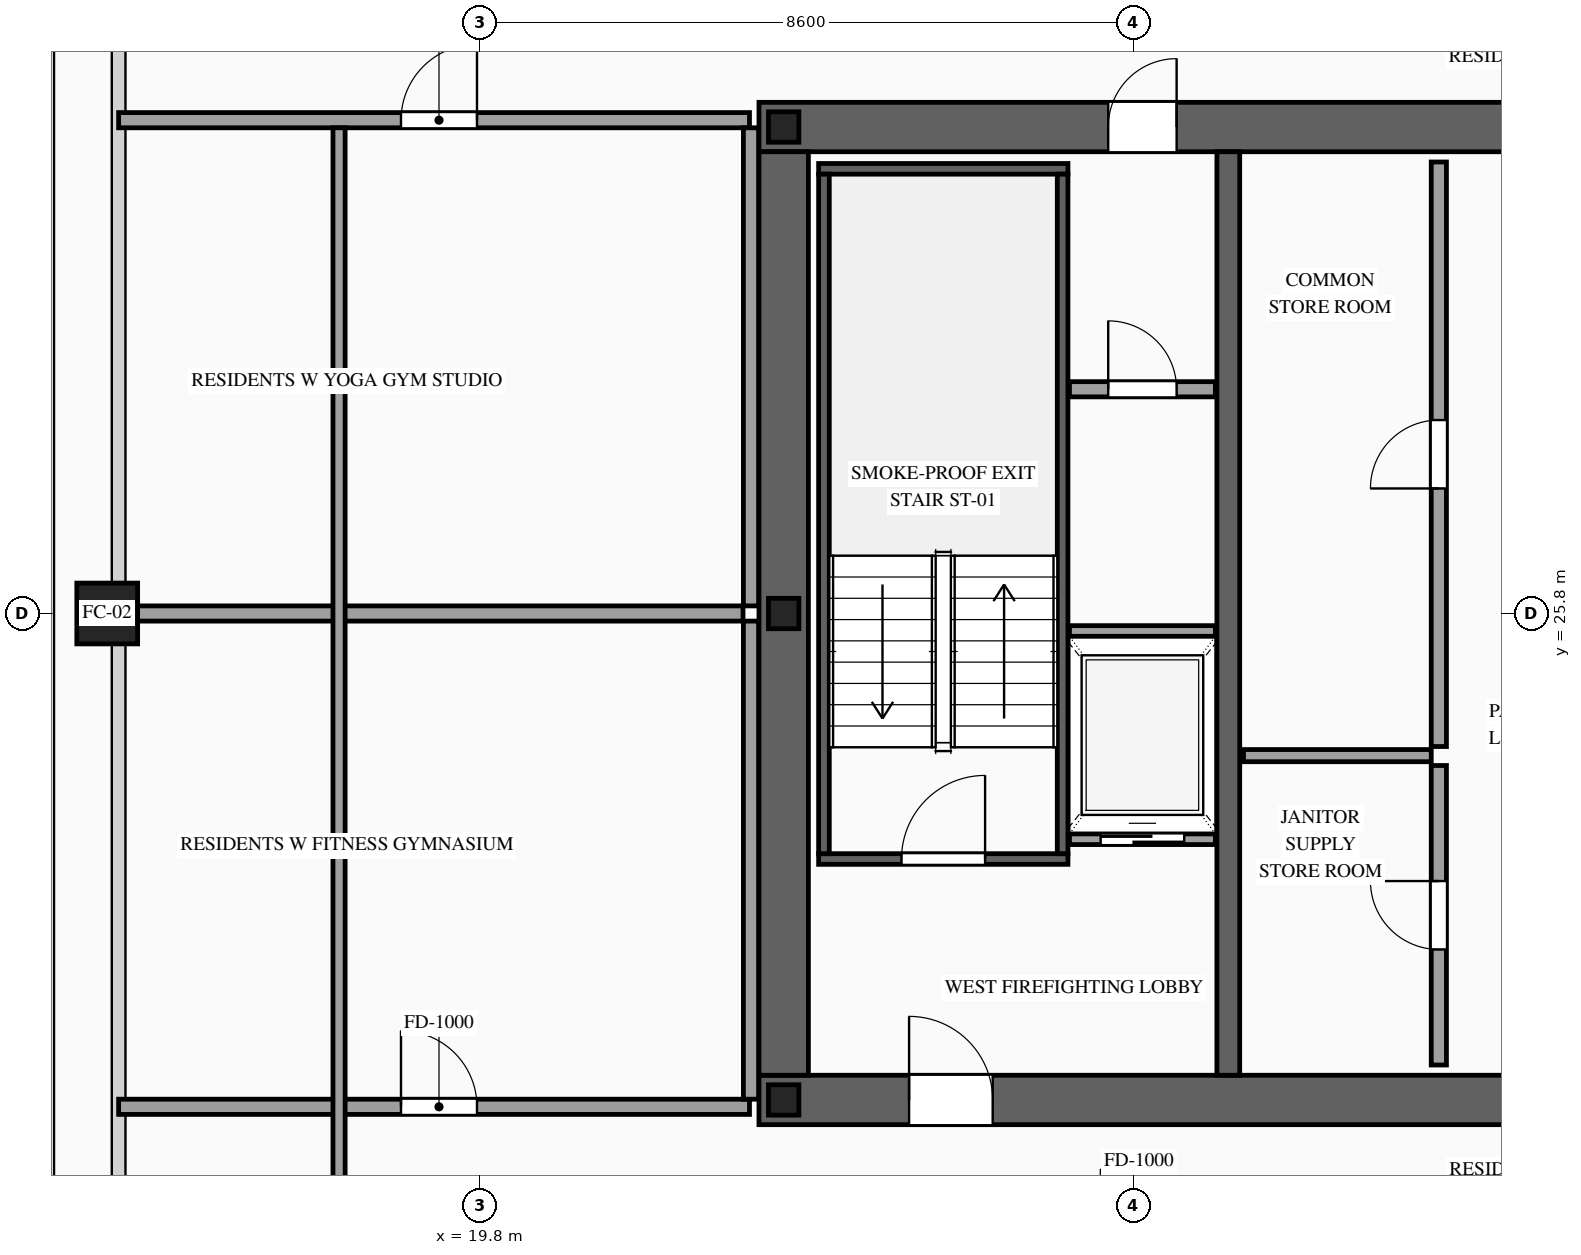
"""IFC4 building model, lengths in metres.
Left out: names, types, materials, properties, quantities, classifications, styles, units other than length and angle.
Written with IfcOpenShell. Run it as: python <this file> out.ifc"""

import sys

from ifc_helpers import new_model, si_unit, direction, frame, frame_2d, origin, origin_2d, place, context, subcontext, project, spatial, rectangle, hollow_rectangle, i_section, extrude, source, transform, mapped, element, fill, save


model = new_model("IFC4")
c1 = context("Model", 3, precision=1e-05, world=origin(), true_north=direction((0.0, 1.0)))
c2 = subcontext(c1, "Body", "Model", "MODEL_VIEW")
j1 = project(units=[si_unit("LENGTHUNIT", "METRE"), si_unit("PLANEANGLEUNIT", "RADIAN")], contexts=[c1])
p1 = place(None, origin())
s1 = spatial("IfcSite", under=j1, at=p1, CompositionType="ELEMENT")
p2 = place(p1, origin())
s2 = spatial("IfcBuilding", under=s1, at=p2, CompositionType="ELEMENT")
p3 = place(p2, frame((0.0, 0.0, 216.0)))
s3 = spatial("IfcBuildingStorey", under=s2, at=p3, CompositionType="ELEMENT", Elevation=216.0)
p4 = place(p3, frame((23.475, 19.4, 0.0), z_axis=(0.0, 0.0, 1.0), x_axis=(1.0, 0.0, 0.0)))
e1 = element("IfcWall", 1, at=p4, inside=s3, PredefinedType="SHEAR", context=c2, shape_type="SweptSolid", body=[
    extrude(rectangle(XDim=27.05, YDim=0.65, at=frame_2d((13.525, 0.0))), origin(), (0.0, 0.0, 1.0), 3.5),
])
p5 = place(p4, frame((1.975, 0.0, 0.0)))
e2 = element("IfcOpeningElement", 2, at=p5, cuts=e1, PredefinedType="OPENING", context=c2, shape_type="SweptSolid", body=[
    extrude(rectangle(XDim=1.1, YDim=2.2, at=frame_2d((0.55, 1.1))), frame((0.0, 0.34, 0.0), z_axis=(0.0, -1.0, 0.0), x_axis=(1.0, 0.0, 0.0)), (0.0, 0.0, 1.0), 0.68),
])
p6 = place(p4, frame((9.875, 0.0, 0.0)))
e3 = element("IfcOpeningElement", 3, at=p6, cuts=e1, PredefinedType="OPENING", context=c2, shape_type="SweptSolid", body=[
    extrude(rectangle(XDim=1.1, YDim=2.2, at=frame_2d((0.55, 1.1))), frame((0.0, 0.34, 0.0), z_axis=(0.0, -1.0, 0.0), x_axis=(1.0, 0.0, 0.0)), (0.0, 0.0, 1.0), 0.68),
])
p7 = place(p4, frame((23.075, 0.0, 0.0)))
e4 = element("IfcOpeningElement", 4, at=p7, cuts=e1, PredefinedType="OPENING", context=c2, shape_type="SweptSolid", body=[
    extrude(rectangle(XDim=1.1, YDim=2.2, at=frame_2d((0.55, 1.1))), frame((0.0, 0.34, 0.0), z_axis=(0.0, -1.0, 0.0), x_axis=(1.0, 0.0, 0.0)), (0.0, 0.0, 1.0), 0.68),
])
p8 = place(p4, frame((19.695, 0.0, 0.0)))
e5 = element("IfcOpeningElement", 5, at=p8, cuts=e1, PredefinedType="OPENING", context=c2, shape_type="SweptSolid", body=[
    extrude(rectangle(XDim=0.9, YDim=2.15, at=frame_2d((0.45, 1.075))), frame((0.0, 0.34, 0.0), z_axis=(0.0, -1.0, 0.0), x_axis=(1.0, 0.0, 0.0)), (0.0, 0.0, 1.0), 0.68),
])
p9 = place(p4, frame((18.255, 0.0, 0.0)))
e6 = element("IfcOpeningElement", 6, at=p9, cuts=e1, PredefinedType="OPENING", context=c2, shape_type="SweptSolid", body=[
    extrude(rectangle(XDim=0.9, YDim=2.15, at=frame_2d((0.45, 1.075))), frame((0.0, 0.34, 0.0), z_axis=(0.0, -1.0, 0.0), x_axis=(1.0, 0.0, 0.0)), (0.0, 0.0, 1.0), 0.68),
])
p10 = place(p3, frame((23.475, 32.2, 0.0), z_axis=(0.0, 0.0, 1.0), x_axis=(1.0, 0.0, 0.0)))
e7 = element("IfcWall", 7, at=p10, inside=s3, PredefinedType="SHEAR", context=c2, shape_type="SweptSolid", body=[
    extrude(rectangle(XDim=27.05, YDim=0.65, at=frame_2d((13.525, 0.0))), origin(), (0.0, 0.0, 1.0), 3.5),
])
p11 = place(p10, frame((4.595, 0.0, 0.0)))
e8 = element("IfcOpeningElement", 8, at=p11, cuts=e7, PredefinedType="OPENING", context=c2, shape_type="SweptSolid", body=[
    extrude(rectangle(XDim=0.9, YDim=2.15, at=frame_2d((0.45, 1.075))), frame((0.0, 0.34, 0.0), z_axis=(0.0, -1.0, 0.0), x_axis=(1.0, 0.0, 0.0)), (0.0, 0.0, 1.0), 0.68),
])
p12 = place(p10, frame((9.875, 0.0, 0.0)))
e9 = element("IfcOpeningElement", 9, at=p12, cuts=e7, PredefinedType="OPENING", context=c2, shape_type="SweptSolid", body=[
    extrude(rectangle(XDim=1.1, YDim=2.2, at=frame_2d((0.55, 1.1))), frame((0.0, 0.34, 0.0), z_axis=(0.0, -1.0, 0.0), x_axis=(1.0, 0.0, 0.0)), (0.0, 0.0, 1.0), 0.68),
])
p13 = place(p10, frame((15.725, 0.0, 0.0)))
e10 = element("IfcOpeningElement", 10, at=p13, cuts=e7, PredefinedType="OPENING", context=c2, shape_type="SweptSolid", body=[
    extrude(rectangle(XDim=1.1, YDim=2.2, at=frame_2d((0.55, 1.1))), frame((0.0, 0.34, 0.0), z_axis=(0.0, -1.0, 0.0), x_axis=(1.0, 0.0, 0.0)), (0.0, 0.0, 1.0), 0.68),
])
p14 = place(p10, frame((18.925, 0.0, 0.0)))
e11 = element("IfcOpeningElement", 11, at=p14, cuts=e7, PredefinedType="OPENING", context=c2, shape_type="SweptSolid", body=[
    extrude(rectangle(XDim=0.9, YDim=2.15, at=frame_2d((0.45, 1.075))), frame((0.0, 0.34, 0.0), z_axis=(0.0, -1.0, 0.0), x_axis=(1.0, 0.0, 0.0)), (0.0, 0.0, 1.0), 0.68),
])
m1 = source(origin(), c2, "Body", "SweptSolid", [
    extrude(rectangle(XDim=12.15, YDim=0.65, at=frame_2d((6.075, 0.0))), origin(), (0.0, 0.0, 1.0), 3.5),
])
p15 = place(p3, frame((23.8, 19.725, 0.0), z_axis=(0.0, 0.0, 1.0), x_axis=(0.0, 1.0, 0.0)))
e12 = element("IfcWall", 12, at=p15, inside=s3, PredefinedType="SHEAR", context=c2, shape_type="MappedRepresentation", body=[
    mapped(m1, transform((0.0, 0.0, 0.0), scale=1.0)),
])
m2 = source(origin(), c2, "Body", "SweptSolid", [
    extrude(rectangle(XDim=12.15, YDim=0.3, at=frame_2d((6.075, 0.0))), origin(), (0.0, 0.0, 1.0), 3.5),
])
p16 = place(p3, frame((29.65, 19.725, 0.0), z_axis=(0.0, 0.0, 1.0), x_axis=(0.0, 1.0, 0.0)))
e13 = element("IfcWall", 13, at=p16, inside=s3, PredefinedType="SOLIDWALL", context=c2, shape_type="MappedRepresentation", body=[
    mapped(m2, transform((0.0, 0.0, 0.0), scale=1.0)),
])
m3 = source(origin(), c2, "Body", "SweptSolid", [
    extrude(i_section(OverallWidth=0.4, OverallDepth=0.4, WebThickness=0.013, FlangeThickness=0.021, at=origin_2d()), origin(), (0.0, 0.0, 1.0), 3.5),
])
for number, where, z_axis, x_axis in (
    (14, (23.8, 19.4, 0.0), (0.0, 0.0, 1.0), (1.0, 0.0, 0.0)),
    (15, (23.8, 25.8, 0.0), (0.0, 0.0, 1.0), (1.0, 0.0, 0.0)),
    (16, (23.8, 32.2, 0.0), (0.0, 0.0, 1.0), (1.0, 0.0, 0.0)),
):
    element("IfcColumn", number, at=place(p3, frame(where, z_axis=z_axis, x_axis=x_axis)), inside=s3, PredefinedType="COLUMN", context=c2, shape_type="MappedRepresentation", body=[
        mapped(m3, transform((0.0, 0.0, 0.0), scale=1.0)),
    ])
m4 = source(origin(), c2, "Body", "SweptSolid", [
    extrude(hollow_rectangle(XDim=0.8, YDim=0.8, WallThickness=0.036, at=origin_2d()), origin(), (0.0, 0.0, 1.0), 3.22),
])
p17 = place(p3, frame((14.9, 25.8, 0.0), z_axis=(0.0, 0.0, 1.0), x_axis=(1.0, 0.0, 0.0)))
e17 = element("IfcColumn", 17, at=p17, inside=s3, PredefinedType="COLUMN", context=c2, shape_type="MappedRepresentation", body=[
    mapped(m4, transform((0.0, 0.0, 0.0), scale=1.0)),
])
p18 = place(p3, frame((27.56, 22.83, 0.0), z_axis=(0.0, 0.0, 1.0), x_axis=(1.0, 0.0, 0.0)))
e18 = element("IfcWall", 18, at=p18, inside=s3, PredefinedType="SOLIDWALL", context=c2, shape_type="SweptSolid", body=[
    extrude(rectangle(XDim=1.92, YDim=0.14, at=frame_2d((0.96, 0.0))), origin(), (0.0, 0.0, 1.0), 3.22),
])
p19 = place(p18, frame((0.41, 0.0, 0.0)))
e19 = element("IfcOpeningElement", 19, at=p19, cuts=e18, PredefinedType="OPENING", context=c2, shape_type="SweptSolid", body=[
    extrude(rectangle(XDim=1.1, YDim=2.2, at=frame_2d((0.55, 1.1))), frame((0.0, 0.085, 0.0), z_axis=(0.0, -1.0, 0.0), x_axis=(1.0, 0.0, 0.0)), (0.0, 0.0, 1.0), 0.17),
])
m5 = source(origin(), c2, "Body", "SweptSolid", [
    extrude(rectangle(XDim=1.92, YDim=0.14, at=frame_2d((0.96, 0.0))), origin(), (0.0, 0.0, 1.0), 3.22),
])
p20 = place(p3, frame((27.56, 25.57, 0.0), z_axis=(0.0, 0.0, 1.0), x_axis=(1.0, 0.0, 0.0)))
e20 = element("IfcWall", 20, at=p20, inside=s3, PredefinedType="SOLIDWALL", context=c2, shape_type="MappedRepresentation", body=[
    mapped(m5, transform((0.0, 0.0, 0.0), scale=1.0)),
])
p21 = place(p3, frame((24.26, 22.57, 0.0), z_axis=(0.0, 0.0, 1.0), x_axis=(1.0, 0.0, 0.0)))
e21 = element("IfcWall", 21, at=p21, inside=s3, PredefinedType="SOLIDWALL", context=c2, shape_type="SweptSolid", body=[
    extrude(rectangle(XDim=3.28, YDim=0.14, at=frame_2d((1.64, 0.0))), origin(), (0.0, 0.0, 1.0), 3.22),
])
p22 = place(p21, frame((1.09, 0.0, 0.0)))
e22 = element("IfcOpeningElement", 22, at=p22, cuts=e21, PredefinedType="OPENING", context=c2, shape_type="SweptSolid", body=[
    extrude(rectangle(XDim=1.1, YDim=2.2, at=frame_2d((0.55, 1.1))), frame((0.0, 0.085, 0.0), z_axis=(0.0, -1.0, 0.0), x_axis=(1.0, 0.0, 0.0)), (0.0, 0.0, 1.0), 0.17),
])
m6 = source(origin(), c2, "Body", "SweptSolid", [
    extrude(rectangle(XDim=3.28, YDim=0.14, at=frame_2d((1.64, 0.0))), origin(), (0.0, 0.0, 1.0), 3.22),
])
p23 = place(p3, frame((24.26, 31.65, 0.0), z_axis=(0.0, 0.0, 1.0), x_axis=(1.0, 0.0, 0.0)))
e23 = element("IfcWall", 23, at=p23, inside=s3, PredefinedType="SOLIDWALL", context=c2, shape_type="MappedRepresentation", body=[
    mapped(m6, transform((0.0, 0.0, 0.0), scale=1.0)),
])
m7 = source(origin(), c2, "Body", "SweptSolid", [
    extrude(rectangle(XDim=8.94, YDim=0.14, at=frame_2d((4.47, 0.0))), origin(), (0.0, 0.0, 1.0), 3.22),
])
for number, where, z_axis, x_axis in (
    (24, (24.33, 22.64, 0.0), (0.0, 0.0, 1.0), (0.0, 1.0, 0.0)),
    (25, (27.47, 22.64, 0.0), (0.0, 0.0, 1.0), (0.0, 1.0, 0.0)),
):
    element("IfcWall", number, at=place(p3, frame(where, z_axis=z_axis, x_axis=x_axis)), inside=s3, PredefinedType="SOLIDWALL", context=c2, shape_type="MappedRepresentation", body=[
        mapped(m7, transform((0.0, 0.0, 0.0), scale=1.0)),
    ])
p24 = place(p3, frame((27.56, 28.75, 0.0), z_axis=(0.0, 0.0, 1.0), x_axis=(1.0, 0.0, 0.0)))
e26 = element("IfcWall", 26, at=p24, inside=s3, PredefinedType="PARTITIONING", context=c2, shape_type="SweptSolid", body=[
    extrude(rectangle(XDim=1.92, YDim=0.2, at=frame_2d((0.96, 0.0))), origin(), (0.0, 0.0, 1.0), 3.22),
])
p25 = place(p24, frame((0.51, 0.0, 0.0)))
e27 = element("IfcOpeningElement", 27, at=p25, cuts=e26, PredefinedType="OPENING", context=c2, shape_type="SweptSolid", body=[
    extrude(rectangle(XDim=0.9, YDim=2.15, at=frame_2d((0.45, 1.075))), frame((0.0, 0.115, 0.0), z_axis=(0.0, -1.0, 0.0), x_axis=(1.0, 0.0, 0.0)), (0.0, 0.0, 1.0), 0.23),
])
p26 = place(p3, frame((32.42, 19.86, 0.0), z_axis=(0.0, 0.0, 1.0), x_axis=(0.0, 1.0, 0.0)))
e28 = element("IfcWall", 28, at=p26, inside=s3, PredefinedType="PARTITIONING", context=c2, shape_type="SweptSolid", body=[
    extrude(rectangle(XDim=3.94, YDim=0.2, at=frame_2d((1.97, 0.0))), origin(), (0.0, 0.0, 1.0), 3.22),
])
p27 = place(p26, frame((1.52, 0.0, 0.0)))
e29 = element("IfcOpeningElement", 29, at=p27, cuts=e28, PredefinedType="OPENING", context=c2, shape_type="SweptSolid", body=[
    extrude(rectangle(XDim=0.9, YDim=2.15, at=frame_2d((0.45, 1.075))), frame((0.0, 0.115, 0.0), z_axis=(0.0, -1.0, 0.0), x_axis=(1.0, 0.0, 0.0)), (0.0, 0.0, 1.0), 0.23),
])
p28 = place(p3, frame((32.42, 24.05, 0.0), z_axis=(0.0, 0.0, 1.0), x_axis=(0.0, 1.0, 0.0)))
e30 = element("IfcWall", 30, at=p28, inside=s3, PredefinedType="PARTITIONING", context=c2, shape_type="SweptSolid", body=[
    extrude(rectangle(XDim=7.69, YDim=0.2, at=frame_2d((3.845, 0.0))), origin(), (0.0, 0.0, 1.0), 3.22),
])
p29 = place(p28, frame((3.395, 0.0, 0.0)))
e31 = element("IfcOpeningElement", 31, at=p29, cuts=e30, PredefinedType="OPENING", context=c2, shape_type="SweptSolid", body=[
    extrude(rectangle(XDim=0.9, YDim=2.15, at=frame_2d((0.45, 1.075))), frame((0.0, 0.115, 0.0), z_axis=(0.0, -1.0, 0.0), x_axis=(1.0, 0.0, 0.0)), (0.0, 0.0, 1.0), 0.23),
])
m8 = source(origin(), c2, "Body", "SweptSolid", [
    extrude(rectangle(XDim=2.47, YDim=0.16, at=frame_2d((1.235, 0.0))), origin(), (0.0, 0.0, 1.0), 3.22),
])
p30 = place(p3, frame((29.85, 23.93, 0.0), z_axis=(0.0, 0.0, 1.0), x_axis=(1.0, 0.0, 0.0)))
e32 = element("IfcWall", 32, at=p30, inside=s3, PredefinedType="PARTITIONING", context=c2, shape_type="MappedRepresentation", body=[
    mapped(m8, transform((0.0, 0.0, 0.0), scale=1.0)),
])
p31 = place(p3, frame((15.05, 19.31, 0.0), z_axis=(0.0, 0.0, 1.0), x_axis=(1.0, 0.0, 0.0)))
e33 = element("IfcWall", 33, at=p31, inside=s3, PredefinedType="PARTITIONING", context=c2, shape_type="SweptSolid", body=[
    extrude(rectangle(XDim=8.3, YDim=0.2, at=frame_2d((4.15, 0.0))), origin(), (0.0, 0.0, 1.0), 3.22),
])
p32 = place(p31, frame((3.715, 0.0, 0.0)))
e34 = element("IfcOpeningElement", 34, at=p32, cuts=e33, PredefinedType="OPENING", context=c2, shape_type="SweptSolid", body=[
    extrude(rectangle(XDim=1.0, YDim=2.2, at=frame_2d((0.5, 1.1))), frame((0.0, 0.115, 0.0), z_axis=(0.0, -1.0, 0.0), x_axis=(1.0, 0.0, 0.0)), (0.0, 0.0, 1.0), 0.23),
])
m9 = source(origin(), c2, "Body", "SweptSolid", [
    extrude(rectangle(XDim=8.215, YDim=0.2, at=frame_2d((4.107, 0.0))), origin(), (0.0, 0.0, 1.0), 1.615),
])
p33 = place(p3, frame((15.05, 25.8, 0.0), z_axis=(0.0, 0.0, 1.0), x_axis=(1.0, 0.0, 0.0)))
e35 = element("IfcWall", 35, at=p33, inside=s3, PredefinedType="PARTITIONING", context=c2, shape_type="MappedRepresentation", body=[
    mapped(m9, transform((0.0, 0.0, 0.0), scale=1.0)),
])
m10 = source(origin(), c2, "Body", "SweptSolid", [
    extrude(rectangle(XDim=6.29, YDim=0.2, at=frame_2d((3.145, 0.0))), origin(), (0.0, 0.0, 1.0), 3.22),
])
p34 = place(p3, frame((23.37, 19.41, 0.0), z_axis=(0.0, 0.0, 1.0), x_axis=(0.0, 1.0, 0.0)))
e36 = element("IfcWall", 36, at=p34, inside=s3, PredefinedType="PARTITIONING", context=c2, shape_type="MappedRepresentation", body=[
    mapped(m10, transform((0.0, 0.0, 0.0), scale=1.0)),
])
p35 = place(p3, frame((15.05, 32.29, 0.0), z_axis=(0.0, 0.0, 1.0), x_axis=(1.0, 0.0, 0.0)))
e37 = element("IfcWall", 37, at=p35, inside=s3, PredefinedType="PARTITIONING", context=c2, shape_type="SweptSolid", body=[
    extrude(rectangle(XDim=8.3, YDim=0.2, at=frame_2d((4.15, 0.0))), origin(), (0.0, 0.0, 1.0), 3.22),
])
p36 = place(p35, frame((3.715, 0.0, 0.0)))
e38 = element("IfcOpeningElement", 38, at=p36, cuts=e37, PredefinedType="OPENING", context=c2, shape_type="SweptSolid", body=[
    extrude(rectangle(XDim=1.0, YDim=2.2, at=frame_2d((0.5, 1.1))), frame((0.0, 0.115, 0.0), z_axis=(0.0, -1.0, 0.0), x_axis=(1.0, 0.0, 0.0)), (0.0, 0.0, 1.0), 0.23),
])
m11 = source(origin(), c2, "Body", "SweptSolid", [
    extrude(rectangle(XDim=28.19, YDim=0.16, at=frame_2d((14.095, 0.0))), origin(), (0.0, 0.0, 1.0), 3.22),
])
p37 = place(p3, frame((17.95, 4.0, 0.0), z_axis=(0.0, 0.0, 1.0), x_axis=(0.0, 1.0, 0.0)))
e39 = element("IfcWall", 39, at=p37, inside=s3, PredefinedType="PARTITIONING", context=c2, shape_type="MappedRepresentation", body=[
    mapped(m11, transform((0.0, 0.0, 0.0), scale=1.0)),
])
p38 = place(p3, frame((23.37, 25.9, 0.0), z_axis=(0.0, 0.0, 1.0), x_axis=(0.0, 1.0, 0.0)))
e40 = element("IfcWall", 40, at=p38, inside=s3, PredefinedType="PARTITIONING", context=c2, shape_type="MappedRepresentation", body=[
    mapped(m10, transform((0.0, 0.0, 0.0), scale=1.0)),
])
m12 = source(origin(), c2, "Body", "SweptSolid", [
    extrude(rectangle(XDim=1.1, YDim=2.2, at=frame_2d((0.55, 1.1))), frame((0.0, 0.025, 0.0), z_axis=(0.0, -1.0, 0.0), x_axis=(1.0, 0.0, 0.0)), (0.0, 0.0, 1.0), 0.05),
])
p39 = place(p19, origin())
e41 = element("IfcDoor", 41, at=p39, inside=s3, OperationType="SLIDING_TO_LEFT", PredefinedType="DOOR", context=c2, shape_type="MappedRepresentation", body=[
    mapped(m12, transform((0.0, 0.0, 0.0), scale=1.0)),
])
fill(e19, e41)
m13 = source(origin(), c2, "Body", "SweptSolid", [
    extrude(rectangle(XDim=1.1, YDim=2.2, at=frame_2d((0.55, 1.1))), frame((0.0, 0.025, 0.0), z_axis=(0.0, -1.0, 0.0), x_axis=(1.0, 0.0, 0.0)), (0.0, 0.0, 1.0), 0.05),
])
p40 = place(p22, origin())
e42 = element("IfcDoor", 42, at=p40, inside=s3, OperationType="SINGLE_SWING_RIGHT", PredefinedType="DOOR", context=c2, shape_type="MappedRepresentation", body=[
    mapped(m13, transform((0.0, 0.0, 0.0), scale=1.0)),
])
fill(e22, e42)
p41 = place(p5, origin())
e43 = element("IfcDoor", 43, at=p41, inside=s3, OperationType="SINGLE_SWING_LEFT", PredefinedType="DOOR", context=c2, shape_type="MappedRepresentation", body=[
    mapped(m13, transform((0.0, 0.0, 0.0), scale=1.0)),
])
fill(e2, e43)
m14 = source(origin(), c2, "Body", "SweptSolid", [
    extrude(rectangle(XDim=0.9, YDim=2.15, at=frame_2d((0.45, 1.075))), frame((0.0, 0.025, 0.0), z_axis=(0.0, -1.0, 0.0), x_axis=(1.0, 0.0, 0.0)), (0.0, 0.0, 1.0), 0.05),
])
p42 = place(p11, origin())
e44 = element("IfcDoor", 44, at=p42, inside=s3, OperationType="SINGLE_SWING_RIGHT", PredefinedType="DOOR", context=c2, shape_type="MappedRepresentation", body=[
    mapped(m14, transform((0.0, 0.0, 0.0), scale=1.0)),
])
fill(e8, e44)
p43 = place(p25, origin())
e45 = element("IfcDoor", 45, at=p43, inside=s3, OperationType="SINGLE_SWING_LEFT", PredefinedType="DOOR", context=c2, shape_type="MappedRepresentation", body=[
    mapped(m14, transform((0.0, 0.0, 0.0), scale=1.0)),
])
fill(e27, e45)
p44 = place(p27, origin())
e46 = element("IfcDoor", 46, at=p44, inside=s3, OperationType="SINGLE_SWING_RIGHT", PredefinedType="DOOR", context=c2, shape_type="MappedRepresentation", body=[
    mapped(m14, transform((0.0, 0.0, 0.0), scale=1.0)),
])
fill(e29, e46)
p45 = place(p29, origin())
e47 = element("IfcDoor", 47, at=p45, inside=s3, OperationType="SINGLE_SWING_LEFT", PredefinedType="DOOR", context=c2, shape_type="MappedRepresentation", body=[
    mapped(m14, transform((0.0, 0.0, 0.0), scale=1.0)),
])
fill(e31, e47)
m15 = source(origin(), c2, "Body", "SweptSolid", [
    extrude(rectangle(XDim=1.0, YDim=2.2, at=frame_2d((0.5, 1.1))), frame((0.0, 0.025, 0.0), z_axis=(0.0, -1.0, 0.0), x_axis=(1.0, 0.0, 0.0)), (0.0, 0.0, 1.0), 0.05),
])
p46 = place(p32, origin())
e48 = element("IfcDoor", 48, at=p46, inside=s3, OperationType="SINGLE_SWING_LEFT", PredefinedType="DOOR", context=c2, shape_type="MappedRepresentation", body=[
    mapped(m15, transform((0.0, 0.0, 0.0), scale=1.0)),
])
fill(e34, e48)
p47 = place(p36, origin())
e49 = element("IfcDoor", 49, at=p47, inside=s3, OperationType="SINGLE_SWING_RIGHT", PredefinedType="DOOR", context=c2, shape_type="MappedRepresentation", body=[
    mapped(m15, transform((0.0, 0.0, 0.0), scale=1.0)),
])
fill(e38, e49)
save(model, sys.argv[1])
